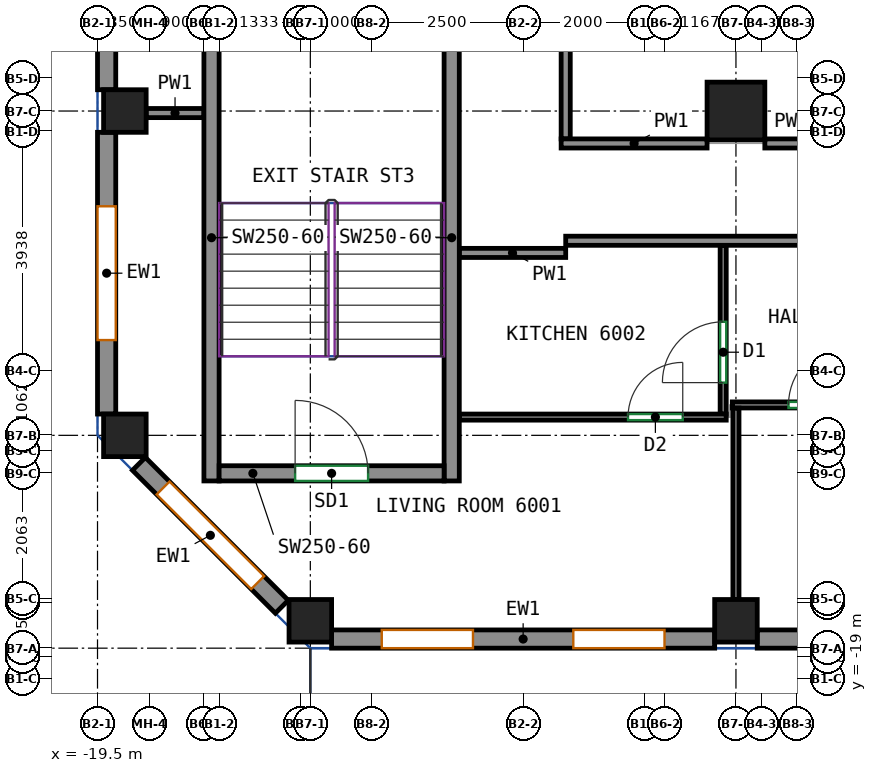
"""IFC4 building model, lengths in metres.
Left out: names, types, materials, properties, quantities, classifications, styles, units other than length and angle.
Written with IfcOpenShell. Run it as: python <this file> out.ifc"""

import sys

from ifc_helpers import new_model, si_unit, direction, frame, frame_2d, origin, origin_2d, place, context, subcontext, project, spatial, rectangle, extrude, source, transform, mapped, element, fill, save


model = new_model("IFC4")
c1 = context("Model", 3, precision=1e-05, world=origin(), true_north=direction((0.0, 1.0)))
c2 = subcontext(c1, "Body", "Model", "MODEL_VIEW")
j1 = project(units=[si_unit("LENGTHUNIT", "METRE"), si_unit("PLANEANGLEUNIT", "RADIAN")], contexts=[c1])
p1 = place(None, origin())
s1 = spatial("IfcSite", under=j1, at=p1, CompositionType="ELEMENT")
p2 = place(p1, origin())
s2 = spatial("IfcBuilding", under=s1, at=p2, CompositionType="ELEMENT")
p3 = place(p2, frame((0.0, 0.0, 249.2)))
s3 = spatial("IfcBuildingStorey", under=s2, at=p3, CompositionType="ELEMENT", Elevation=249.2)
m1 = source(origin(), c2, "Body", "SweptSolid", [
    extrude(rectangle(XDim=0.7, YDim=0.7, at=origin_2d()), origin(), (0.0, 0.0, 1.0), 3.12),
])
for number, where, z_axis, x_axis in (
    (1, (-19.05, -15.0, 0.0), (0.0, 0.0, 1.0), (1.0, 0.0, 0.0)),
    (2, (-19.05, -9.667, 0.0), (0.0, 0.0, 1.0), (1.0, 0.0, 0.0)),
    (3, (-16.0, -18.05, 0.0), (0.0, 0.0, 1.0), (1.0, 0.0, 0.0)),
    (4, (-9.0, -18.05, 0.0), (0.0, 0.0, 1.0), (1.0, 0.0, 0.0)),
):
    element("IfcColumn", number, at=place(p3, frame(where, z_axis=z_axis, x_axis=x_axis)), inside=s3, PredefinedType="COLUMN", context=c2, shape_type="MappedRepresentation", body=[
        mapped(m1, transform((0.0, 0.0, 0.0))),
    ])
m2 = source(origin(), c2, "Body", "SweptSolid", [
    extrude(rectangle(XDim=0.95, YDim=0.95, at=origin_2d()), origin(), (0.0, 0.0, 1.0), 3.12),
])
p4 = place(p3, frame((-9.0, -9.667, 0.0), z_axis=(0.0, 0.0, 1.0), x_axis=(1.0, 0.0, 0.0)))
e5 = element("IfcColumn", 5, at=p4, inside=s3, PredefinedType="COLUMN", context=c2, shape_type="MappedRepresentation", body=[
    mapped(m2, transform((0.0, 0.0, 0.0))),
])
m3 = source(origin(), c2, "Body", "SweptSolid", [
    extrude(rectangle(XDim=8.0, YDim=0.25, at=frame_2d((4.0, 0.0))), origin(), (0.0, 0.0, 1.0), 3.12),
])
for number, where, z_axis, x_axis in (
    (6, (-17.625, -15.75, 0.0), (0.0, 0.0, 1.0), (0.0, 1.0, 0.0)),
    (7, (-13.675, -15.75, 0.0), (0.0, 0.0, 1.0), (0.0, 1.0, 0.0)),
):
    element("IfcWall", number, at=place(p3, frame(where, z_axis=z_axis, x_axis=x_axis)), inside=s3, PredefinedType="SHEAR", context=c2, shape_type="MappedRepresentation", body=[
        mapped(m3, transform((0.0, 0.0, 0.0))),
    ])
m4 = source(origin(), c2, "Body", "SweptSolid", [
    extrude(rectangle(XDim=3.7, YDim=0.25, at=frame_2d((1.85, 0.0))), origin(), (0.0, 0.0, 1.0), 3.12),
])
p5 = place(p3, frame((-17.5, -15.625, 0.0), z_axis=(0.0, 0.0, 1.0), x_axis=(1.0, 0.0, 0.0)))
e8 = element("IfcWall", 8, at=p5, inside=s3, PredefinedType="SHEAR", context=c2, shape_type="MappedRepresentation", body=[
    mapped(m4, transform((0.0, 0.0, 0.0))),
])
p6 = place(p5, frame((1.25, 0.0, 0.0)))
e9 = element("IfcOpeningElement", 9, at=p6, cuts=e8, PredefinedType="OPENING", context=c2, shape_type="SweptSolid", body=[
    extrude(rectangle(XDim=1.2, YDim=2.1, at=frame_2d((0.6, 1.05))), frame((0.0, 0.135, 0.0), z_axis=(0.0, -1.0, 0.0), x_axis=(1.0, 0.0, 0.0)), (0.0, 0.0, 1.0), 0.27),
])
m5 = source(origin(), c2, "Body", "SweptSolid", [
    extrude(rectangle(XDim=6.3, YDim=0.3, at=frame_2d((3.15, 0.0))), origin(), (0.0, 0.0, 1.0), 3.12),
])
p7 = place(p3, frame((-15.65, -18.35, 0.0), z_axis=(0.0, 0.0, 1.0), x_axis=(1.0, 0.0, 0.0)))
e10 = element("IfcWall", 10, at=p7, inside=s3, PredefinedType="SOLIDWALL", context=c2, shape_type="MappedRepresentation", body=[
    mapped(m5, transform((0.0, 0.0, 0.0))),
])
p8 = place(p7, frame((0.825, 0.0, 0.8)))
e11 = element("IfcOpeningElement", 11, at=p8, cuts=e10, PredefinedType="OPENING", context=c2, shape_type="SweptSolid", body=[
    extrude(rectangle(XDim=1.5, YDim=2.05, at=frame_2d((0.75, 1.025))), frame((0.0, 0.16, 0.0), z_axis=(0.0, -1.0, 0.0), x_axis=(1.0, 0.0, 0.0)), (0.0, 0.0, 1.0), 0.32),
])
p9 = place(p7, frame((3.975, 0.0, 0.8)))
e12 = element("IfcOpeningElement", 12, at=p9, cuts=e10, PredefinedType="OPENING", context=c2, shape_type="SweptSolid", body=[
    extrude(rectangle(XDim=1.5, YDim=2.05, at=frame_2d((0.75, 1.025))), frame((0.0, 0.16, 0.0), z_axis=(0.0, -1.0, 0.0), x_axis=(1.0, 0.0, 0.0)), (0.0, 0.0, 1.0), 0.32),
])
p10 = place(p3, frame((-8.65, -18.35, 0.0), z_axis=(0.0, 0.0, 1.0), x_axis=(1.0, 0.0, 0.0)))
e13 = element("IfcWall", 13, at=p10, inside=s3, PredefinedType="SOLIDWALL", context=c2, shape_type="MappedRepresentation", body=[
    mapped(m5, transform((0.0, 0.0, 0.0))),
])
p11 = place(p10, frame((0.825, 0.0, 0.8)))
e14 = element("IfcOpeningElement", 14, at=p11, cuts=e13, PredefinedType="OPENING", context=c2, shape_type="SweptSolid", body=[
    extrude(rectangle(XDim=1.5, YDim=2.05, at=frame_2d((0.75, 1.025))), frame((0.0, 0.16, 0.0), z_axis=(0.0, -1.0, 0.0), x_axis=(1.0, 0.0, 0.0)), (0.0, 0.0, 1.0), 0.32),
])
p12 = place(p10, frame((3.975, 0.0, 0.8)))
e15 = element("IfcOpeningElement", 15, at=p12, cuts=e13, PredefinedType="OPENING", context=c2, shape_type="SweptSolid", body=[
    extrude(rectangle(XDim=1.5, YDim=2.05, at=frame_2d((0.75, 1.025))), frame((0.0, 0.16, 0.0), z_axis=(0.0, -1.0, 0.0), x_axis=(1.0, 0.0, 0.0)), (0.0, 0.0, 1.0), 0.32),
])
m6 = source(origin(), c2, "Body", "SweptSolid", [
    extrude(rectangle(XDim=8.133, YDim=0.3, at=frame_2d((4.067, 0.0))), origin(), (0.0, 0.0, 1.0), 3.12),
])
p13 = place(p3, frame((-19.35, -1.183, 0.0), z_axis=(0.0, 0.0, 1.0), x_axis=(0.0, -1.0, 0.0)))
e16 = element("IfcWall", 16, at=p13, inside=s3, PredefinedType="SOLIDWALL", context=c2, shape_type="MappedRepresentation", body=[
    mapped(m6, transform((0.0, 0.0, 0.0))),
])
p14 = place(p13, frame((0.933, 0.0, 0.8)))
e17 = element("IfcOpeningElement", 17, at=p14, cuts=e16, PredefinedType="OPENING", context=c2, shape_type="SweptSolid", body=[
    extrude(rectangle(XDim=2.2, YDim=2.05, at=frame_2d((1.1, 1.025))), frame((0.0, 0.16, 0.0), z_axis=(0.0, -1.0, 0.0), x_axis=(1.0, 0.0, 0.0)), (0.0, 0.0, 1.0), 0.32),
])
p15 = place(p13, frame((5.0, 0.0, 0.8)))
e18 = element("IfcOpeningElement", 18, at=p15, cuts=e16, PredefinedType="OPENING", context=c2, shape_type="SweptSolid", body=[
    extrude(rectangle(XDim=2.2, YDim=2.05, at=frame_2d((1.1, 1.025))), frame((0.0, 0.16, 0.0), z_axis=(0.0, -1.0, 0.0), x_axis=(1.0, 0.0, 0.0)), (0.0, 0.0, 1.0), 0.32),
])
m7 = source(origin(), c2, "Body", "SweptSolid", [
    extrude(rectangle(XDim=4.633, YDim=0.3, at=frame_2d((2.317, 0.0))), origin(), (0.0, 0.0, 1.0), 3.12),
])
p16 = place(p3, frame((-19.35, -10.017, 0.0), z_axis=(0.0, 0.0, 1.0), x_axis=(0.0, -1.0, 0.0)))
e19 = element("IfcWall", 19, at=p16, inside=s3, PredefinedType="SOLIDWALL", context=c2, shape_type="MappedRepresentation", body=[
    mapped(m7, transform((0.0, 0.0, 0.0))),
])
p17 = place(p16, frame((1.217, 0.0, 0.8)))
e20 = element("IfcOpeningElement", 20, at=p17, cuts=e19, PredefinedType="OPENING", context=c2, shape_type="SweptSolid", body=[
    extrude(rectangle(XDim=2.2, YDim=2.05, at=frame_2d((1.1, 1.025))), frame((0.0, 0.16, 0.0), z_axis=(0.0, -1.0, 0.0), x_axis=(1.0, 0.0, 0.0)), (0.0, 0.0, 1.0), 0.32),
])
m8 = source(origin(), c2, "Body", "SweptSolid", [
    extrude(rectangle(XDim=3.323, YDim=0.3, at=frame_2d((1.662, 0.0))), origin(), (0.0, 0.0, 1.0), 3.12),
])
p18 = place(p3, frame((-18.819, -15.469, 0.0), z_axis=(0.0, 0.0, 1.0), x_axis=(0.707070049321, -0.707143511144, 0.0)))
e21 = element("IfcWall", 21, at=p18, inside=s3, PredefinedType="SOLIDWALL", context=c2, shape_type="MappedRepresentation", body=[
    mapped(m8, transform((0.0, 0.0, 0.0))),
])
p19 = place(p18, frame((0.562, 0.0, 0.8)))
e22 = element("IfcOpeningElement", 22, at=p19, cuts=e21, PredefinedType="OPENING", context=c2, shape_type="SweptSolid", body=[
    extrude(rectangle(XDim=2.2, YDim=2.05, at=frame_2d((1.1, 1.025))), frame((0.0, 0.16, 0.0), z_axis=(0.0, -1.0, 0.0), x_axis=(1.0, 0.0, 0.0)), (0.0, 0.0, 1.0), 0.32),
])
p20 = place(p3, frame((-11.8, -11.8, 0.0), z_axis=(0.0, 0.0, 1.0), x_axis=(1.0, 0.0, 0.0)))
e23 = element("IfcWall", 23, at=p20, inside=s3, PredefinedType="PARTITIONING", context=c2, shape_type="SweptSolid", body=[
    extrude(rectangle(XDim=27.31, YDim=0.15, at=frame_2d((13.655, 0.0))), origin(), (0.0, 0.0, 1.0), 3.12),
])
p21 = place(p20, frame((5.021, 0.0, 0.0)))
e24 = element("IfcOpeningElement", 24, at=p21, cuts=e23, PredefinedType="OPENING", context=c2, shape_type="SweptSolid", body=[
    extrude(rectangle(XDim=1.0, YDim=2.1, at=frame_2d((0.5, 1.05))), frame((0.0, 0.085, 0.0), z_axis=(0.0, -1.0, 0.0), x_axis=(1.0, 0.0, 0.0)), (0.0, 0.0, 1.0), 0.17),
])
p22 = place(p20, frame((18.457, 0.0, 0.0)))
e25 = element("IfcOpeningElement", 25, at=p22, cuts=e23, PredefinedType="OPENING", context=c2, shape_type="SweptSolid", body=[
    extrude(rectangle(XDim=1.0, YDim=2.1, at=frame_2d((0.5, 1.05))), frame((0.0, 0.085, 0.0), z_axis=(0.0, -1.0, 0.0), x_axis=(1.0, 0.0, 0.0)), (0.0, 0.0, 1.0), 0.17),
])
p23 = place(p3, frame((-13.55, -12.0, 0.0), z_axis=(0.0, 0.0, 1.0), x_axis=(1.0, 0.0, 0.0)))
e26 = element("IfcWall", 26, at=p23, inside=s3, PredefinedType="PARTITIONING", context=c2, shape_type="SweptSolid", body=[
    extrude(rectangle(XDim=1.75, YDim=0.15, at=frame_2d((0.875, 0.0))), origin(), (0.0, 0.0, 1.0), 3.12),
])
p24 = place(p3, frame((-18.7, -9.7, 0.0), z_axis=(0.0, 0.0, 1.0), x_axis=(1.0, 0.0, 0.0)))
e27 = element("IfcWall", 27, at=p24, inside=s3, PredefinedType="PARTITIONING", context=c2, shape_type="SweptSolid", body=[
    extrude(rectangle(XDim=0.95, YDim=0.15, at=frame_2d((0.475, 0.0))), origin(), (0.0, 0.0, 1.0), 3.12),
])
p25 = place(p3, frame((-11.8, -10.125, 0.0), z_axis=(0.0, 0.0, 1.0), x_axis=(0.0, 1.0, 0.0)))
e28 = element("IfcWall", 28, at=p25, inside=s3, PredefinedType="PARTITIONING", context=c2, shape_type="SweptSolid", body=[
    extrude(rectangle(XDim=4.785, YDim=0.15, at=frame_2d((2.393, 0.0))), origin(), (0.0, 0.0, 1.0), 3.12),
])
p26 = place(p25, frame((3.07, 0.0, 0.0)))
e29 = element("IfcOpeningElement", 29, at=p26, cuts=e28, PredefinedType="OPENING", context=c2, shape_type="SweptSolid", body=[
    extrude(rectangle(XDim=0.9, YDim=2.1, at=frame_2d((0.45, 1.05))), frame((0.0, 0.085, 0.0), z_axis=(0.0, -1.0, 0.0), x_axis=(1.0, 0.0, 0.0)), (0.0, 0.0, 1.0), 0.17),
])
p27 = place(p3, frame((-8.525, -10.2, 0.0), z_axis=(0.0, 0.0, 1.0), x_axis=(1.0, 0.0, 0.0)))
e30 = element("IfcWall", 30, at=p27, inside=s3, PredefinedType="PARTITIONING", context=c2, shape_type="SweptSolid", body=[
    extrude(rectangle(XDim=2.1, YDim=0.15, at=frame_2d((1.05, 0.0))), origin(), (0.0, 0.0, 1.0), 3.12),
])
p28 = place(p3, frame((-11.875, -10.2, 0.0), z_axis=(0.0, 0.0, 1.0), x_axis=(1.0, 0.0, 0.0)))
e31 = element("IfcWall", 31, at=p28, inside=s3, PredefinedType="PARTITIONING", context=c2, shape_type="SweptSolid", body=[
    extrude(rectangle(XDim=2.4, YDim=0.15, at=frame_2d((1.2, 0.0))), origin(), (0.0, 0.0, 1.0), 3.12),
])
p29 = place(p3, frame((-9.21, -14.65, 0.0), z_axis=(0.0, 0.0, 1.0), x_axis=(0.0, 1.0, 0.0)))
e32 = element("IfcWall", 32, at=p29, inside=s3, PredefinedType="PARTITIONING", context=c2, shape_type="SweptSolid", body=[
    extrude(rectangle(XDim=2.773, YDim=0.1, at=frame_2d((1.386, 0.0))), origin(), (0.0, 0.0, 1.0), 3.12),
])
p30 = place(p29, frame((0.517, 0.0, 0.0)))
e33 = element("IfcOpeningElement", 33, at=p30, cuts=e32, PredefinedType="OPENING", context=c2, shape_type="SweptSolid", body=[
    extrude(rectangle(XDim=1.0, YDim=2.1, at=frame_2d((0.5, 1.05))), frame((0.0, 0.06, 0.0), z_axis=(0.0, -1.0, 0.0), x_axis=(1.0, 0.0, 0.0)), (0.0, 0.0, 1.0), 0.12),
])
p31 = place(p3, frame((-13.55, -14.7, 0.0), z_axis=(0.0, 0.0, 1.0), x_axis=(1.0, 0.0, 0.0)))
e34 = element("IfcWall", 34, at=p31, inside=s3, PredefinedType="PARTITIONING", context=c2, shape_type="SweptSolid", body=[
    extrude(rectangle(XDim=4.39, YDim=0.1, at=frame_2d((2.195, 0.0))), origin(), (0.0, 0.0, 1.0), 3.12),
])
p32 = place(p31, frame((2.775, 0.0, 0.0)))
e35 = element("IfcOpeningElement", 35, at=p32, cuts=e34, PredefinedType="OPENING", context=c2, shape_type="SweptSolid", body=[
    extrude(rectangle(XDim=0.9, YDim=2.1, at=frame_2d((0.45, 1.05))), frame((0.0, 0.06, 0.0), z_axis=(0.0, -1.0, 0.0), x_axis=(1.0, 0.0, 0.0)), (0.0, 0.0, 1.0), 0.12),
])
p33 = place(p3, frame((-9.06, -14.5, 0.0), z_axis=(0.0, 0.0, 1.0), x_axis=(1.0, 0.0, 0.0)))
e36 = element("IfcWall", 36, at=p33, inside=s3, PredefinedType="PARTITIONING", context=c2, shape_type="SweptSolid", body=[
    extrude(rectangle(XDim=24.66, YDim=0.1, at=frame_2d((12.33, 0.0))), origin(), (0.0, 0.0, 1.0), 3.12),
])
p34 = place(p33, frame((0.924, 0.0, 0.0)))
e37 = element("IfcOpeningElement", 37, at=p34, cuts=e36, PredefinedType="OPENING", context=c2, shape_type="SweptSolid", body=[
    extrude(rectangle(XDim=1.0, YDim=2.1, at=frame_2d((0.5, 1.05))), frame((0.0, 0.06, 0.0), z_axis=(0.0, -1.0, 0.0), x_axis=(1.0, 0.0, 0.0)), (0.0, 0.0, 1.0), 0.12),
])
p35 = place(p33, frame((15.945, 0.0, 0.0)))
e38 = element("IfcOpeningElement", 38, at=p35, cuts=e36, PredefinedType="OPENING", context=c2, shape_type="SweptSolid", body=[
    extrude(rectangle(XDim=1.0, YDim=2.1, at=frame_2d((0.5, 1.05))), frame((0.0, 0.06, 0.0), z_axis=(0.0, -1.0, 0.0), x_axis=(1.0, 0.0, 0.0)), (0.0, 0.0, 1.0), 0.12),
])
p36 = place(p33, frame((18.387, 0.0, 0.0)))
e39 = element("IfcOpeningElement", 39, at=p36, cuts=e36, PredefinedType="OPENING", context=c2, shape_type="SweptSolid", body=[
    extrude(rectangle(XDim=1.0, YDim=2.1, at=frame_2d((0.5, 1.05))), frame((0.0, 0.06, 0.0), z_axis=(0.0, -1.0, 0.0), x_axis=(1.0, 0.0, 0.0)), (0.0, 0.0, 1.0), 0.12),
])
p37 = place(p3, frame((-9.0, -17.7, 0.0), z_axis=(0.0, 0.0, 1.0), x_axis=(0.0, 1.0, 0.0)))
e40 = element("IfcWall", 40, at=p37, inside=s3, PredefinedType="PARTITIONING", context=c2, shape_type="SweptSolid", body=[
    extrude(rectangle(XDim=3.148, YDim=0.1, at=frame_2d((1.574, 0.0))), origin(), (0.0, 0.0, 1.0), 3.12),
])
p38 = place(p8, origin())
e41 = element("IfcWindow", 41, at=p38, inside=s3, PartitioningType="SINGLE_PANEL", PredefinedType="WINDOW", context=c2, shape_type="SweptSolid", body=[
    extrude(rectangle(XDim=1.5, YDim=2.05, at=frame_2d((0.75, 1.025))), frame((0.0, 0.03, 0.0), z_axis=(0.0, -1.0, 0.0), x_axis=(1.0, 0.0, 0.0)), (0.0, 0.0, 1.0), 0.06),
])
fill(e11, e41)
p39 = place(p9, origin())
e42 = element("IfcWindow", 42, at=p39, inside=s3, PartitioningType="SINGLE_PANEL", PredefinedType="WINDOW", context=c2, shape_type="SweptSolid", body=[
    extrude(rectangle(XDim=1.5, YDim=2.05, at=frame_2d((0.75, 1.025))), frame((0.0, 0.03, 0.0), z_axis=(0.0, -1.0, 0.0), x_axis=(1.0, 0.0, 0.0)), (0.0, 0.0, 1.0), 0.06),
])
fill(e12, e42)
p40 = place(p17, origin())
e43 = element("IfcWindow", 43, at=p40, inside=s3, PartitioningType="SINGLE_PANEL", PredefinedType="WINDOW", context=c2, shape_type="SweptSolid", body=[
    extrude(rectangle(XDim=2.2, YDim=2.05, at=frame_2d((1.1, 1.025))), frame((0.0, 0.03, 0.0), z_axis=(0.0, -1.0, 0.0), x_axis=(1.0, 0.0, 0.0)), (0.0, 0.0, 1.0), 0.06),
])
fill(e20, e43)
p41 = place(p19, origin())
e44 = element("IfcWindow", 44, at=p41, inside=s3, PartitioningType="SINGLE_PANEL", PredefinedType="WINDOW", context=c2, shape_type="SweptSolid", body=[
    extrude(rectangle(XDim=2.2, YDim=2.05, at=frame_2d((1.1, 1.025))), frame((0.0, 0.03, 0.0), z_axis=(0.0, -1.0, 0.0), x_axis=(1.0, 0.0, 0.0)), (0.0, 0.0, 1.0), 0.06),
])
fill(e22, e44)
p42 = place(p6, origin())
e45 = element("IfcDoor", 45, at=p42, inside=s3, OperationType="DOUBLE_DOOR_SINGLE_SWING", PredefinedType="DOOR", context=c2, shape_type="SweptSolid", body=[
    extrude(rectangle(XDim=1.2, YDim=2.1, at=frame_2d((0.6, 1.05))), frame((0.0, 0.025, 0.0), z_axis=(0.0, -1.0, 0.0), x_axis=(1.0, 0.0, 0.0)), (0.0, 0.0, 1.0), 0.05),
])
fill(e9, e45)
p43 = place(p32, origin())
e46 = element("IfcDoor", 46, at=p43, inside=s3, OperationType="SINGLE_SWING_RIGHT", PredefinedType="DOOR", context=c2, shape_type="SweptSolid", body=[
    extrude(rectangle(XDim=0.9, YDim=2.1, at=frame_2d((0.45, 1.05))), frame((0.0, 0.025, 0.0), z_axis=(0.0, -1.0, 0.0), x_axis=(1.0, 0.0, 0.0)), (0.0, 0.0, 1.0), 0.05),
])
fill(e35, e46)
p44 = place(p34, origin())
e47 = element("IfcDoor", 47, at=p44, inside=s3, OperationType="SINGLE_SWING_RIGHT", PredefinedType="DOOR", context=c2, shape_type="SweptSolid", body=[
    extrude(rectangle(XDim=1.0, YDim=2.1, at=frame_2d((0.5, 1.05))), frame((0.0, 0.025, 0.0), z_axis=(0.0, -1.0, 0.0), x_axis=(1.0, 0.0, 0.0)), (0.0, 0.0, 1.0), 0.05),
])
fill(e37, e47)
p45 = place(p30, origin())
e48 = element("IfcDoor", 48, at=p45, inside=s3, OperationType="SINGLE_SWING_LEFT", PredefinedType="DOOR", context=c2, shape_type="SweptSolid", body=[
    extrude(rectangle(XDim=1.0, YDim=2.1, at=frame_2d((0.5, 1.05))), frame((0.0, 0.025, 0.0), z_axis=(0.0, -1.0, 0.0), x_axis=(1.0, 0.0, 0.0)), (0.0, 0.0, 1.0), 0.05),
])
fill(e33, e48)
save(model, sys.argv[1])
